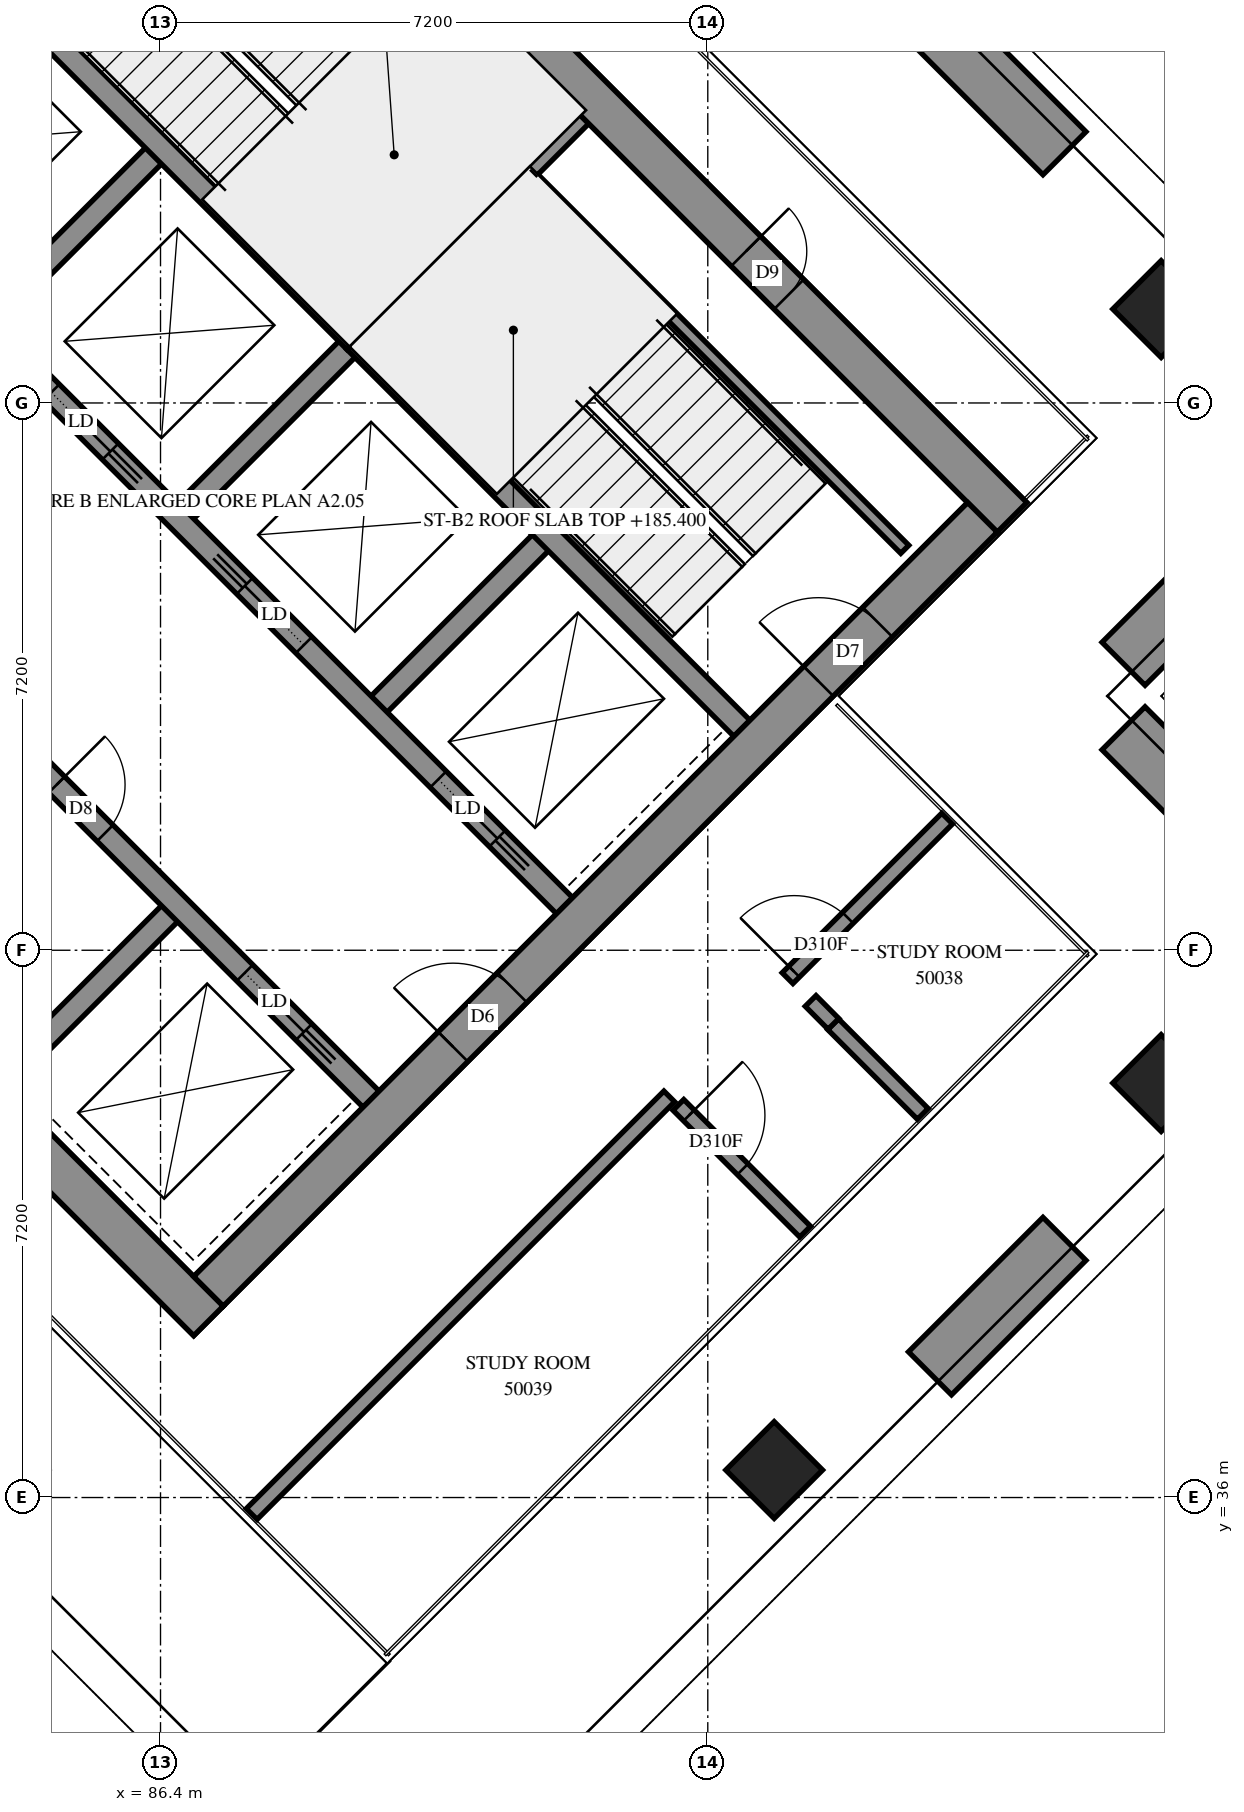
"""IFC4 building model, lengths in metres.
Left out: names, types, materials, properties, quantities, classifications, styles, units other than length and angle.
Written with IfcOpenShell. Run it as: python <this file> out.ifc"""

import sys

from ifc_helpers import new_model, si_unit, direction, frame, frame_2d, origin, origin_2d, place, context, subcontext, project, spatial, rectangle, extrude, element, fill, save


model = new_model("IFC4")
c1 = context("Model", 3, precision=1e-05, world=origin(), true_north=direction((0.0, 1.0)))
c2 = subcontext(c1, "Body", "Model", "MODEL_VIEW")
j1 = project(units=[si_unit("LENGTHUNIT", "METRE"), si_unit("PLANEANGLEUNIT", "RADIAN")], contexts=[c1])
p1 = place(None, origin())
s1 = spatial("IfcSite", under=j1, at=p1, CompositionType="ELEMENT")
p2 = place(p1, origin())
s2 = spatial("IfcBuilding", under=s1, at=p2, CompositionType="ELEMENT")
p3 = place(p2, frame((0.0, 0.0, 185.4)))
s3 = spatial("IfcBuildingStorey", under=s2, at=p3, CompositionType="ELEMENT", Elevation=185.4)
for number, where, z_axis, x_axis in (
    (1, (99.565, 51.635, 0.0), (0.0, 0.0, 1.0), (0.707, -0.707, 0.0)),
    (2, (99.565, 41.453, 0.0), (0.0, 0.0, 1.0), (0.707, -0.707, 0.0)),
    (3, (94.474, 36.362, 0.0), (0.0, 0.0, 1.0), (0.707, -0.707, 0.0)),
):
    element("IfcColumn", number, at=place(p3, frame(where, z_axis=z_axis, x_axis=x_axis)), inside=s3, PredefinedType="COLUMN", context=c2, shape_type="SweptSolid", body=[
        extrude(rectangle(XDim=0.9, YDim=0.9, at=origin_2d()), origin(), (0.0, 0.0, 1.0), 3.9),
    ])
p4 = place(p3, frame((76.071, 49.284, -0.3), z_axis=(0.0, 0.0, 1.0), x_axis=(0.7071035554, -0.707110007, 0.0)))
e4 = element("IfcWall", 4, at=p4, inside=s3, PredefinedType="SHEAR", context=c2, shape_type="SweptSolid", body=[
    extrude(rectangle(XDim=15.5, YDim=0.55, at=frame_2d((7.75, 0.0))), origin(), (0.0, 0.0, 1.0), 3.5),
])
p5 = place(p3, frame((86.642, 59.855, -0.3), z_axis=(0.0, 0.0, 1.0), x_axis=(0.707110007, -0.7071035554, 0.0)))
e5 = element("IfcWall", 5, at=p5, inside=s3, PredefinedType="SHEAR", context=c2, shape_type="SweptSolid", body=[
    extrude(rectangle(XDim=15.5, YDim=0.55, at=frame_2d((7.75, 0.0))), origin(), (0.0, 0.0, 1.0), 3.5),
])
p6 = place(p5, frame((10.55, 0.0, 0.3)))
e6 = element("IfcOpeningElement", 6, at=p6, cuts=e5, PredefinedType="OPENING", context=c2, shape_type="SweptSolid", body=[
    extrude(rectangle(XDim=0.8, YDim=2.1, at=frame_2d((0.4, 1.05))), frame((0.0, 0.285, 0.0), z_axis=(0.0, -1.0, 0.0), x_axis=(1.0, 0.0, 0.0)), (0.0, 0.0, 1.0), 0.57),
])
p7 = place(p3, frame((76.46, 49.284, -0.3), z_axis=(0.0, 0.0, 1.0), x_axis=(0.7071067812, 0.7071067812, 0.0)))
e7 = element("IfcWall", 7, at=p7, inside=s3, PredefinedType="SHEAR", context=c2, shape_type="SweptSolid", body=[
    extrude(rectangle(XDim=14.4, YDim=0.55, at=frame_2d((7.2, 0.0))), origin(), (0.0, 0.0, 1.0), 3.5),
])
p8 = place(p7, frame((4.55, 0.0, 0.3)))
e8 = element("IfcOpeningElement", 8, at=p8, cuts=e7, PredefinedType="OPENING", context=c2, shape_type="SweptSolid", body=[
    extrude(rectangle(XDim=1.1, YDim=2.1, at=frame_2d((0.55, 1.05))), frame((0.0, 0.285, 0.0), z_axis=(0.0, -1.0, 0.0), x_axis=(1.0, 0.0, 0.0)), (0.0, 0.0, 1.0), 0.57),
])
p9 = place(p7, frame((11.35, 0.0, 0.3)))
e9 = element("IfcOpeningElement", 9, at=p9, cuts=e7, PredefinedType="OPENING", context=c2, shape_type="SweptSolid", body=[
    extrude(rectangle(XDim=1.1, YDim=2.1, at=frame_2d((0.55, 1.05))), frame((0.0, 0.285, 0.0), z_axis=(0.0, -1.0, 0.0), x_axis=(1.0, 0.0, 0.0)), (0.0, 0.0, 1.0), 0.57),
])
p10 = place(p3, frame((87.031, 38.713, -0.3), z_axis=(0.0, 0.0, 1.0), x_axis=(0.707103309, 0.7071102534, 0.0)))
e10 = element("IfcWall", 10, at=p10, inside=s3, PredefinedType="SHEAR", context=c2, shape_type="SweptSolid", body=[
    extrude(rectangle(XDim=14.4, YDim=0.55, at=frame_2d((7.2, 0.0))), origin(), (0.0, 0.0, 1.0), 3.5),
])
p11 = place(p10, frame((4.55, 0.0, 0.3)))
e11 = element("IfcOpeningElement", 11, at=p11, cuts=e10, PredefinedType="OPENING", context=c2, shape_type="SweptSolid", body=[
    extrude(rectangle(XDim=1.1, YDim=2.1, at=frame_2d((0.55, 1.05))), frame((0.0, 0.285, 0.0), z_axis=(0.0, -1.0, 0.0), x_axis=(1.0, 0.0, 0.0)), (0.0, 0.0, 1.0), 0.57),
])
p12 = place(p10, frame((11.35, 0.0, 0.3)))
e12 = element("IfcOpeningElement", 12, at=p12, cuts=e10, PredefinedType="OPENING", context=c2, shape_type="SweptSolid", body=[
    extrude(rectangle(XDim=1.1, YDim=2.1, at=frame_2d((0.55, 1.05))), frame((0.0, 0.285, 0.0), z_axis=(0.0, -1.0, 0.0), x_axis=(1.0, 0.0, 0.0)), (0.0, 0.0, 1.0), 0.57),
])
p13 = place(p3, frame((84.079, 51.423, 0.0), z_axis=(0.0, 0.0, 1.0), x_axis=(0.7071219326, 0.7070916295, 0.0)))
e13 = element("IfcWall", 13, at=p13, inside=s3, PredefinedType="SOLIDWALL", context=c2, shape_type="SweptSolid", body=[
    extrude(rectangle(XDim=3.3, YDim=0.3, at=frame_2d((1.65, 0.0))), origin(), (0.0, 0.0, 1.0), 3.9),
])
p14 = place(p3, frame((86.625, 48.878, 0.0), z_axis=(0.0, 0.0, 1.0), x_axis=(0.7071067812, 0.7071067812, 0.0)))
e14 = element("IfcWall", 14, at=p14, inside=s3, PredefinedType="SOLIDWALL", context=c2, shape_type="SweptSolid", body=[
    extrude(rectangle(XDim=3.3, YDim=0.3, at=frame_2d((1.65, 0.0))), origin(), (0.0, 0.0, 1.0), 3.9),
])
p15 = place(p3, frame((84.291, 41.453, 0.0), z_axis=(0.0, 0.0, 1.0), x_axis=(0.7071067812, 0.7071067812, 0.0)))
e15 = element("IfcWall", 15, at=p15, inside=s3, PredefinedType="SOLIDWALL", context=c2, shape_type="SweptSolid", body=[
    extrude(rectangle(XDim=3.3, YDim=0.3, at=frame_2d((1.65, 0.0))), origin(), (0.0, 0.0, 1.0), 3.9),
])
p16 = place(p3, frame((89.17, 46.332, 0.0), z_axis=(0.0, 0.0, 1.0), x_axis=(0.7071067812, 0.7071067812, 0.0)))
e16 = element("IfcWall", 16, at=p16, inside=s3, PredefinedType="SOLIDWALL", context=c2, shape_type="SweptSolid", body=[
    extrude(rectangle(XDim=3.3, YDim=0.3, at=frame_2d((1.65, 0.0))), origin(), (0.0, 0.0, 1.0), 3.9),
])
p17 = place(p3, frame((78.988, 51.423, 0.0), z_axis=(0.0, 0.0, 1.0), x_axis=(0.7071067812, -0.7071067812, 0.0)))
e17 = element("IfcWall", 17, at=p17, inside=s3, PredefinedType="SOLIDWALL", context=c2, shape_type="SweptSolid", body=[
    extrude(rectangle(XDim=14.4, YDim=0.3, at=frame_2d((7.2, 0.0))), origin(), (0.0, 0.0, 1.0), 3.9),
])
p18 = place(p17, frame((1.35, 0.0, 0.0)))
e18 = element("IfcOpeningElement", 18, at=p18, cuts=e17, PredefinedType="OPENING", context=c2, shape_type="SweptSolid", body=[
    extrude(rectangle(XDim=0.9, YDim=2.1, at=frame_2d((0.45, 1.05))), frame((0.0, 0.16, 0.0), z_axis=(0.0, -1.0, 0.0), x_axis=(1.0, 0.0, 0.0)), (0.0, 0.0, 1.0), 0.32),
])
p19 = place(p17, frame((4.95, 0.0, 0.0)))
e19 = element("IfcOpeningElement", 19, at=p19, cuts=e17, PredefinedType="OPENING", context=c2, shape_type="SweptSolid", body=[
    extrude(rectangle(XDim=0.9, YDim=2.1, at=frame_2d((0.45, 1.05))), frame((0.0, 0.16, 0.0), z_axis=(0.0, -1.0, 0.0), x_axis=(1.0, 0.0, 0.0)), (0.0, 0.0, 1.0), 0.32),
])
p20 = place(p17, frame((8.55, 0.0, 0.0)))
e20 = element("IfcOpeningElement", 20, at=p20, cuts=e17, PredefinedType="OPENING", context=c2, shape_type="SweptSolid", body=[
    extrude(rectangle(XDim=0.9, YDim=2.1, at=frame_2d((0.45, 1.05))), frame((0.0, 0.16, 0.0), z_axis=(0.0, -1.0, 0.0), x_axis=(1.0, 0.0, 0.0)), (0.0, 0.0, 1.0), 0.32),
])
p21 = place(p17, frame((12.05, 0.0, 0.0)))
e21 = element("IfcOpeningElement", 21, at=p21, cuts=e17, PredefinedType="OPENING", context=c2, shape_type="SweptSolid", body=[
    extrude(rectangle(XDim=1.1, YDim=2.1, at=frame_2d((0.55, 1.05))), frame((0.0, 0.16, 0.0), z_axis=(0.0, -1.0, 0.0), x_axis=(1.0, 0.0, 0.0)), (0.0, 0.0, 1.0), 0.32),
])
p22 = place(p3, frame((81.534, 53.969, 0.0), z_axis=(0.0, 0.0, 1.0), x_axis=(0.707103309, -0.7071102534, 0.0)))
e22 = element("IfcWall", 22, at=p22, inside=s3, PredefinedType="SOLIDWALL", context=c2, shape_type="SweptSolid", body=[
    extrude(rectangle(XDim=14.4, YDim=0.3, at=frame_2d((7.2, 0.0))), origin(), (0.0, 0.0, 1.0), 3.9),
])
p23 = place(p22, frame((1.25, 0.0, 0.0)))
e23 = element("IfcOpeningElement", 23, at=p23, cuts=e22, PredefinedType="OPENING", context=c2, shape_type="SweptSolid", body=[
    extrude(rectangle(XDim=1.1, YDim=2.1, at=frame_2d((0.55, 1.05))), frame((0.0, 0.16, 0.0), z_axis=(0.0, -1.0, 0.0), x_axis=(1.0, 0.0, 0.0)), (0.0, 0.0, 1.0), 0.32),
])
p24 = place(p22, frame((4.85, 0.0, 0.0)))
e24 = element("IfcOpeningElement", 24, at=p24, cuts=e22, PredefinedType="OPENING", context=c2, shape_type="SweptSolid", body=[
    extrude(rectangle(XDim=1.1, YDim=2.1, at=frame_2d((0.55, 1.05))), frame((0.0, 0.16, 0.0), z_axis=(0.0, -1.0, 0.0), x_axis=(1.0, 0.0, 0.0)), (0.0, 0.0, 1.0), 0.32),
])
p25 = place(p22, frame((8.45, 0.0, 0.0)))
e25 = element("IfcOpeningElement", 25, at=p25, cuts=e22, PredefinedType="OPENING", context=c2, shape_type="SweptSolid", body=[
    extrude(rectangle(XDim=1.1, YDim=2.1, at=frame_2d((0.55, 1.05))), frame((0.0, 0.16, 0.0), z_axis=(0.0, -1.0, 0.0), x_axis=(1.0, 0.0, 0.0)), (0.0, 0.0, 1.0), 0.32),
])
p26 = place(p22, frame((12.05, 0.0, 0.0)))
e26 = element("IfcOpeningElement", 26, at=p26, cuts=e22, PredefinedType="OPENING", context=c2, shape_type="SweptSolid", body=[
    extrude(rectangle(XDim=1.1, YDim=2.1, at=frame_2d((0.55, 1.05))), frame((0.0, 0.16, 0.0), z_axis=(0.0, -1.0, 0.0), x_axis=(1.0, 0.0, 0.0)), (0.0, 0.0, 1.0), 0.32),
])
for number, where, z_axis, x_axis in (
    (27, (83.867, 56.302, 0.0), (0.0, 0.0, 1.0), (0.707, -0.707, 0.0)),
    (28, (88.958, 51.211, 0.0), (0.0, 0.0, 1.0), (0.707, -0.707, 0.0)),
):
    element("IfcWall", number, at=place(p3, frame(where, z_axis=z_axis, x_axis=x_axis)), inside=s3, PredefinedType="SOLIDWALL", context=c2, shape_type="SweptSolid", body=[
        extrude(rectangle(XDim=7.2, YDim=0.3, at=frame_2d((3.6, 0.0))), origin(), (0.0, 0.0, 1.0), 3.9),
    ])
p27 = place(p3, frame((88.958, 51.211, 0.0), z_axis=(0.0, 0.0, 1.0), x_axis=(0.7071067812, 0.7071067812, 0.0)))
e29 = element("IfcWall", 29, at=p27, inside=s3, PredefinedType="SOLIDWALL", context=c2, shape_type="SweptSolid", body=[
    extrude(rectangle(XDim=4.2, YDim=0.3, at=frame_2d((2.1, 0.0))), origin(), (0.0, 0.0, 1.0), 3.9),
])
p28 = place(p3, frame((96.523, 37.634, 0.0), z_axis=(0.0, 0.0, 1.0), x_axis=(0.7071067812, 0.7071067812, 0.0)))
e30 = element("IfcWall", 30, at=p28, inside=s3, PredefinedType="SOLIDWALL", context=c2, shape_type="SweptSolid", body=[
    extrude(rectangle(XDim=2.502, YDim=0.8, at=frame_2d((1.251, 0.0))), origin(), (0.0, 0.0, 1.0), 0.65),
])
p29 = place(p3, frame((101.615, 43.574, 0.0), z_axis=(0.0, 0.0, 1.0), x_axis=(-0.707092892, 0.7071206701, 0.0)))
e31 = element("IfcWall", 31, at=p29, inside=s3, PredefinedType="SOLIDWALL", context=c2, shape_type="SweptSolid", body=[
    extrude(rectangle(XDim=3.6, YDim=0.8, at=frame_2d((1.8, 0.0))), origin(), (0.0, 0.0, 1.0), 0.65),
])
p30 = place(p3, frame((99.07, 46.968, 0.0), z_axis=(0.0, 0.0, 1.0), x_axis=(0.7071067812, 0.7071067812, 0.0)))
e32 = element("IfcWall", 32, at=p30, inside=s3, PredefinedType="SOLIDWALL", context=c2, shape_type="SweptSolid", body=[
    extrude(rectangle(XDim=3.6, YDim=0.8, at=frame_2d((1.8, 0.0))), origin(), (0.0, 0.0, 1.0), 0.65),
])
p31 = place(p3, frame((98.293, 53.685, 0.0), z_axis=(0.0, 0.0, 1.0), x_axis=(-0.7071067812, 0.7071067812, 0.0)))
e33 = element("IfcWall", 33, at=p31, inside=s3, PredefinedType="SOLIDWALL", context=c2, shape_type="SweptSolid", body=[
    extrude(rectangle(XDim=2.502, YDim=0.8, at=frame_2d((1.251, 0.0))), origin(), (0.0, 0.0, 1.0), 0.65),
])
p32 = place(p3, frame((91.313, 53.354, 0.0), z_axis=(0.0, 0.0, 1.0), x_axis=(0.7071140275, -0.7070995348, 0.0)))
e34 = element("IfcWall", 34, at=p32, inside=s3, PredefinedType="PARTITIONING", context=c2, shape_type="SweptSolid", body=[
    extrude(rectangle(XDim=6.9, YDim=0.15, at=frame_2d((3.45, 0.0))), origin(), (0.0, 0.0, 1.0), 3.9),
])
p33 = place(p3, frame((87.599, 35.783, 0.0), z_axis=(0.0, 0.0, 1.0), x_axis=(0.7071067812, 0.7071067812, 0.0)))
e35 = element("IfcWall", 35, at=p33, inside=s3, PredefinedType="PARTITIONING", context=c2, shape_type="SweptSolid", body=[
    extrude(rectangle(XDim=7.77, YDim=0.2, at=frame_2d((3.885, 0.0))), origin(), (0.0, 0.0, 1.0), 3.9),
])
p34 = place(p3, frame((94.649, 42.833, 0.0), z_axis=(0.0, 0.0, 1.0), x_axis=(0.7071067812, 0.7071067812, 0.0)))
e36 = element("IfcWall", 36, at=p34, inside=s3, PredefinedType="PARTITIONING", context=c2, shape_type="SweptSolid", body=[
    extrude(rectangle(XDim=2.97, YDim=0.2, at=frame_2d((1.485, 0.0))), origin(), (0.0, 0.0, 1.0), 3.9),
])
p35 = place(p34, frame((0.122, 0.0, 0.0)))
e37 = element("IfcOpeningElement", 37, at=p35, cuts=e36, PredefinedType="OPENING", context=c2, shape_type="SweptSolid", body=[
    extrude(rectangle(XDim=1.0, YDim=2.1, at=frame_2d((0.5, 1.05))), frame((0.0, 0.11, 0.0), z_axis=(0.0, -1.0, 0.0), x_axis=(1.0, 0.0, 0.0)), (0.0, 0.0, 1.0), 0.22),
])
p36 = place(p3, frame((93.213, 41.165, 0.0), z_axis=(0.0, 0.0, 1.0), x_axis=(0.7071067812, -0.7071067812, 0.0)))
e38 = element("IfcWall", 38, at=p36, inside=s3, PredefinedType="PARTITIONING", context=c2, shape_type="SweptSolid", body=[
    extrude(rectangle(XDim=2.359, YDim=0.2, at=frame_2d((1.179, 0.0))), origin(), (0.0, 0.0, 1.0), 3.9),
])
p37 = place(p36, frame((0.196, 0.0, 0.0)))
e39 = element("IfcOpeningElement", 39, at=p37, cuts=e38, PredefinedType="OPENING", context=c2, shape_type="SweptSolid", body=[
    extrude(rectangle(XDim=1.0, YDim=2.1, at=frame_2d((0.5, 1.05))), frame((0.0, 0.11, 0.0), z_axis=(0.0, -1.0, 0.0), x_axis=(1.0, 0.0, 0.0)), (0.0, 0.0, 1.0), 0.22),
])
p38 = place(p3, frame((95.249, 42.227, 0.0), z_axis=(0.0, 0.0, 1.0), x_axis=(0.7071067812, -0.7071067812, 0.0)))
e40 = element("IfcWall", 40, at=p38, inside=s3, PredefinedType="PARTITIONING", context=c2, shape_type="SweptSolid", body=[
    extrude(rectangle(XDim=1.669, YDim=0.2, at=frame_2d((0.834, 0.0))), origin(), (0.0, 0.0, 1.0), 3.9),
])
p39 = place(p3, frame((94.953, 42.533, 0.0), z_axis=(0.0, 0.0, 1.0), x_axis=(0.7047536999, -0.7094520579, 0.0)))
e41 = element("IfcWall", 41, at=p39, inside=s3, PredefinedType="PARTITIONING", context=c2, shape_type="SweptSolid", body=[
    extrude(rectangle(XDim=0.426, YDim=0.2, at=frame_2d((0.213, 0.0))), origin(), (0.0, 0.0, 1.0), 3.9),
])
p40 = place(p6, origin())
e42 = element("IfcDoor", 42, at=p40, inside=s3, OperationType="SINGLE_SWING_RIGHT", PredefinedType="DOOR", context=c2, shape_type="SweptSolid", body=[
    extrude(rectangle(XDim=0.8, YDim=2.1, at=frame_2d((0.4, 1.05))), frame((0.0, 0.025, 0.0), z_axis=(0.0, -1.0, 0.0), x_axis=(1.0, 0.0, 0.0)), (0.0, 0.0, 1.0), 0.05),
])
fill(e6, e42)
p41 = place(p11, origin())
e43 = element("IfcDoor", 43, at=p41, inside=s3, OperationType="DOUBLE_DOOR_SINGLE_SWING", PredefinedType="DOOR", context=c2, shape_type="SweptSolid", body=[
    extrude(rectangle(XDim=1.1, YDim=2.1, at=frame_2d((0.55, 1.05))), frame((0.0, 0.025, 0.0), z_axis=(0.0, -1.0, 0.0), x_axis=(1.0, 0.0, 0.0)), (0.0, 0.0, 1.0), 0.05),
])
fill(e11, e43)
p42 = place(p12, origin())
e44 = element("IfcDoor", 44, at=p42, inside=s3, OperationType="SINGLE_SWING_RIGHT", PredefinedType="DOOR", context=c2, shape_type="SweptSolid", body=[
    extrude(rectangle(XDim=1.1, YDim=2.1, at=frame_2d((0.55, 1.05))), frame((0.0, 0.025, 0.0), z_axis=(0.0, -1.0, 0.0), x_axis=(1.0, 0.0, 0.0)), (0.0, 0.0, 1.0), 0.05),
])
fill(e12, e44)
p43 = place(p20, origin())
e45 = element("IfcDoor", 45, at=p43, inside=s3, OperationType="SINGLE_SWING_LEFT", PredefinedType="DOOR", context=c2, shape_type="SweptSolid", body=[
    extrude(rectangle(XDim=0.9, YDim=2.1, at=frame_2d((0.45, 1.05))), frame((0.0, 0.025, 0.0), z_axis=(0.0, -1.0, 0.0), x_axis=(1.0, 0.0, 0.0)), (0.0, 0.0, 1.0), 0.05),
])
fill(e20, e45)
p44 = place(p21, origin())
e46 = element("IfcDoor", 46, at=p44, inside=s3, OperationType="SLIDING_TO_RIGHT", PredefinedType="DOOR", context=c2, shape_type="SweptSolid", body=[
    extrude(rectangle(XDim=1.1, YDim=2.1, at=frame_2d((0.55, 1.05))), frame((0.0, 0.025, 0.0), z_axis=(0.0, -1.0, 0.0), x_axis=(1.0, 0.0, 0.0)), (0.0, 0.0, 1.0), 0.05),
])
fill(e21, e46)
p45 = place(p24, origin())
e47 = element("IfcDoor", 47, at=p45, inside=s3, OperationType="SLIDING_TO_RIGHT", PredefinedType="DOOR", context=c2, shape_type="SweptSolid", body=[
    extrude(rectangle(XDim=1.1, YDim=2.1, at=frame_2d((0.55, 1.05))), frame((0.0, 0.025, 0.0), z_axis=(0.0, -1.0, 0.0), x_axis=(1.0, 0.0, 0.0)), (0.0, 0.0, 1.0), 0.05),
])
fill(e24, e47)
p46 = place(p25, origin())
e48 = element("IfcDoor", 48, at=p46, inside=s3, OperationType="SLIDING_TO_LEFT", PredefinedType="DOOR", context=c2, shape_type="SweptSolid", body=[
    extrude(rectangle(XDim=1.1, YDim=2.1, at=frame_2d((0.55, 1.05))), frame((0.0, 0.025, 0.0), z_axis=(0.0, -1.0, 0.0), x_axis=(1.0, 0.0, 0.0)), (0.0, 0.0, 1.0), 0.05),
])
fill(e25, e48)
p47 = place(p26, origin())
e49 = element("IfcDoor", 49, at=p47, inside=s3, OperationType="SLIDING_TO_RIGHT", PredefinedType="DOOR", context=c2, shape_type="SweptSolid", body=[
    extrude(rectangle(XDim=1.1, YDim=2.1, at=frame_2d((0.55, 1.05))), frame((0.0, 0.025, 0.0), z_axis=(0.0, -1.0, 0.0), x_axis=(1.0, 0.0, 0.0)), (0.0, 0.0, 1.0), 0.05),
])
fill(e26, e49)
p48 = place(p35, origin())
e50 = element("IfcDoor", 50, at=p48, inside=s3, OperationType="SINGLE_SWING_RIGHT", PredefinedType="DOOR", context=c2, shape_type="SweptSolid", body=[
    extrude(rectangle(XDim=1.0, YDim=2.1, at=frame_2d((0.5, 1.05))), frame((0.0, 0.025, 0.0), z_axis=(0.0, -1.0, 0.0), x_axis=(1.0, 0.0, 0.0)), (0.0, 0.0, 1.0), 0.05),
])
fill(e37, e50)
p49 = place(p37, origin())
e51 = element("IfcDoor", 51, at=p49, inside=s3, OperationType="SINGLE_SWING_LEFT", PredefinedType="DOOR", context=c2, shape_type="SweptSolid", body=[
    extrude(rectangle(XDim=1.0, YDim=2.1, at=frame_2d((0.5, 1.05))), frame((0.0, 0.025, 0.0), z_axis=(0.0, -1.0, 0.0), x_axis=(1.0, 0.0, 0.0)), (0.0, 0.0, 1.0), 0.05),
])
fill(e39, e51)
save(model, sys.argv[1])
